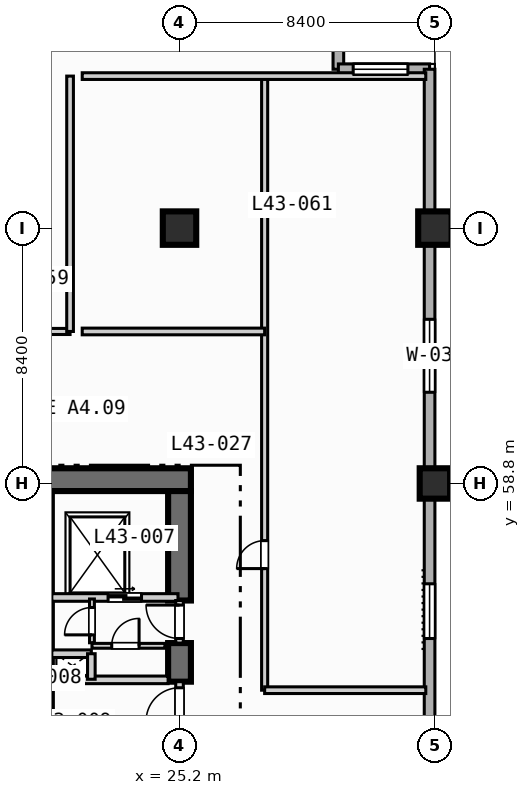
"""IFC4 building model, lengths in metres.
Left out: names, types, materials, properties, quantities, classifications, styles, units other than length and angle.
Written with IfcOpenShell. Run it as: python <this file> out.ifc"""

import sys

from ifc_helpers import new_model, si_unit, direction, frame, frame_2d, origin, origin_2d, place, context, subcontext, project, spatial, rectangle, extrude, element, fill, save


model = new_model("IFC4")
c1 = context("Model", 3, precision=1e-05, world=origin(), true_north=direction((0.0, 1.0)))
c2 = subcontext(c1, "Body", "Model", "MODEL_VIEW")
j1 = project(units=[si_unit("LENGTHUNIT", "METRE"), si_unit("PLANEANGLEUNIT", "RADIAN")], contexts=[c1])
p1 = place(None, origin())
s1 = spatial("IfcSite", under=j1, at=p1, CompositionType="ELEMENT")
p2 = place(p1, origin())
s2 = spatial("IfcBuilding", under=s1, at=p2, CompositionType="ELEMENT")
p3 = place(p2, frame((0.0, 0.0, 179.1)))
s3 = spatial("IfcBuildingStorey", under=s2, at=p3, CompositionType="ELEMENT", Elevation=179.1)
p4 = place(p3, frame((20.5, 58.925, 0.0), z_axis=(0.0, 0.0, 1.0), x_axis=(1.0, 0.0, 0.0)))
e1 = element("IfcWall", 1, at=p4, inside=s3, PredefinedType="SHEAR", context=c2, shape_type="SweptSolid", body=[
    extrude(rectangle(XDim=5.075, YDim=0.75, at=frame_2d((2.538, 0.0))), origin(), (0.0, 0.0, 1.0), 3.47),
])
p5 = place(p3, frame((25.2, 52.28, 0.0), z_axis=(0.0, 0.0, 1.0), x_axis=(0.0, 1.0, 0.0)))
e2 = element("IfcWall", 2, at=p5, inside=s3, PredefinedType="SHEAR", context=c2, shape_type="SweptSolid", body=[
    extrude(rectangle(XDim=1.27, YDim=0.75, at=frame_2d((0.635, 0.0))), origin(), (0.0, 0.0, 1.0), 3.47),
])
p6 = place(p3, frame((25.2, 54.95, 0.0), z_axis=(0.0, 0.0, 1.0), x_axis=(0.0, 1.0, 0.0)))
e3 = element("IfcWall", 3, at=p6, inside=s3, PredefinedType="SHEAR", context=c2, shape_type="SweptSolid", body=[
    extrude(rectangle(XDim=3.6, YDim=0.75, at=frame_2d((1.8, 0.0))), origin(), (0.0, 0.0, 1.0), 3.47),
])
p7 = place(p3, frame((25.2, 67.2, 0.0), z_axis=(0.0, 0.0, 1.0), x_axis=(1.0, 0.0, 0.0)))
e4 = element("IfcColumn", 4, at=p7, inside=s3, PredefinedType="COLUMN", context=c2, shape_type="SweptSolid", body=[
    extrude(rectangle(XDim=1.1, YDim=1.1, at=origin_2d()), origin(), (0.0, 0.0, 1.0), 3.7),
])
p8 = place(p3, frame((33.6, 58.8, 0.0), z_axis=(0.0, 0.0, 1.0), x_axis=(1.0, 0.0, 0.0)))
e5 = element("IfcColumn", 5, at=p8, inside=s3, PredefinedType="COLUMN", context=c2, shape_type="SweptSolid", body=[
    extrude(rectangle(XDim=1.0, YDim=1.0, at=origin_2d()), origin(), (0.0, 0.0, 1.0), 3.7),
])
p9 = place(p3, frame((33.6, 67.2, 0.0), z_axis=(0.0, 0.0, 1.0), x_axis=(1.0, 0.0, 0.0)))
e6 = element("IfcColumn", 6, at=p9, inside=s3, PredefinedType="COLUMN", context=c2, shape_type="SweptSolid", body=[
    extrude(rectangle(XDim=1.1, YDim=1.1, at=origin_2d()), origin(), (0.0, 0.0, 1.0), 3.7),
])
p10 = place(p3, frame((30.425, 75.425, 0.0), z_axis=(0.0, 0.0, 1.0), x_axis=(0.0, -1.0, 0.0)))
e7 = element("IfcWall", 7, at=p10, inside=s3, PredefinedType="STANDARD", context=c2, shape_type="SweptSolid", body=[
    extrude(rectangle(XDim=3.0, YDim=0.35, at=frame_2d((1.5, 0.0))), origin(), (0.0, 0.0, 1.0), 3.47),
])
p11 = place(p3, frame((30.425, 72.425, 0.0), z_axis=(0.0, 0.0, 1.0), x_axis=(1.0, 0.0, 0.0)))
e8 = element("IfcWall", 8, at=p11, inside=s3, PredefinedType="STANDARD", context=c2, shape_type="SweptSolid", body=[
    extrude(rectangle(XDim=3.0, YDim=0.35, at=frame_2d((1.5, 0.0))), origin(), (0.0, 0.0, 1.0), 3.47),
])
p12 = place(p11, frame((0.488, 0.0, 0.85)))
e9 = element("IfcOpeningElement", 9, at=p12, cuts=e8, PredefinedType="OPENING", context=c2, shape_type="SweptSolid", body=[
    extrude(rectangle(XDim=1.8, YDim=1.8, at=frame_2d((0.9, 0.9))), frame((0.0, 0.185, 0.0), z_axis=(0.0, -1.0, 0.0), x_axis=(1.0, 0.0, 0.0)), (0.0, 0.0, 1.0), 0.37),
])
p13 = place(p3, frame((33.425, 72.425, 0.0), z_axis=(0.0, 0.0, 1.0), x_axis=(0.0, -1.0, 0.0)))
e10 = element("IfcWall", 10, at=p13, inside=s3, PredefinedType="STANDARD", context=c2, shape_type="SweptSolid", body=[
    extrude(rectangle(XDim=39.0, YDim=0.35, at=frame_2d((19.5, 0.0))), origin(), (0.0, 0.0, 1.0), 3.47),
])
p14 = place(p13, frame((33.725, 0.0, 0.85)))
e11 = element("IfcOpeningElement", 11, at=p14, cuts=e10, PredefinedType="OPENING", context=c2, shape_type="SweptSolid", body=[
    extrude(rectangle(XDim=1.8, YDim=1.8, at=frame_2d((0.9, 0.9))), frame((0.0, 0.185, 0.0), z_axis=(0.0, -1.0, 0.0), x_axis=(1.0, 0.0, 0.0)), (0.0, 0.0, 1.0), 0.37),
])
p15 = place(p13, frame((16.925, 0.0, 0.85)))
e12 = element("IfcOpeningElement", 12, at=p15, cuts=e10, PredefinedType="OPENING", context=c2, shape_type="SweptSolid", body=[
    extrude(rectangle(XDim=1.8, YDim=1.8, at=frame_2d((0.9, 0.9))), frame((0.0, 0.185, 0.0), z_axis=(0.0, -1.0, 0.0), x_axis=(1.0, 0.0, 0.0)), (0.0, 0.0, 1.0), 0.37),
])
p16 = place(p13, frame((8.225, 0.0, 0.85)))
e13 = element("IfcOpeningElement", 13, at=p16, cuts=e10, PredefinedType="OPENING", context=c2, shape_type="SweptSolid", body=[
    extrude(rectangle(XDim=2.4, YDim=1.95, at=frame_2d((1.2, 0.975))), frame((0.0, 0.185, 0.0), z_axis=(0.0, -1.0, 0.0), x_axis=(1.0, 0.0, 0.0)), (0.0, 0.0, 1.0), 0.37),
])
p17 = place(p3, frame((25.2, 50.8, 0.0), z_axis=(0.0, 0.0, 1.0), x_axis=(0.0, 1.0, 0.0)))
e14 = element("IfcWall", 14, at=p17, inside=s3, PredefinedType="SOLIDWALL", context=c2, shape_type="SweptSolid", body=[
    extrude(rectangle(XDim=1.48, YDim=0.25, at=frame_2d((0.74, 0.0))), origin(), (0.0, 0.0, 1.0), 3.47),
])
p18 = place(p17, frame((0.18, 0.0, 0.0)))
e15 = element("IfcOpeningElement", 15, at=p18, cuts=e14, PredefinedType="OPENING", context=c2, shape_type="SweptSolid", body=[
    extrude(rectangle(XDim=1.1, YDim=2.15, at=frame_2d((0.55, 1.075))), frame((0.0, 0.135, 0.0), z_axis=(0.0, -1.0, 0.0), x_axis=(1.0, 0.0, 0.0)), (0.0, 0.0, 1.0), 0.27),
])
p19 = place(p3, frame((21.0, 52.34, 0.0), z_axis=(0.0, 0.0, 1.0), x_axis=(1.0, 0.0, 0.0)))
e16 = element("IfcWall", 16, at=p19, inside=s3, PredefinedType="SOLIDWALL", context=c2, shape_type="SweptSolid", body=[
    extrude(rectangle(XDim=3.825, YDim=0.25, at=frame_2d((1.913, 0.0))), origin(), (0.0, 0.0, 1.0), 3.47),
])
p20 = place(p3, frame((21.0, 55.05, 0.0), z_axis=(0.0, 0.0, 1.0), x_axis=(1.0, 0.0, 0.0)))
e17 = element("IfcWall", 17, at=p20, inside=s3, PredefinedType="SOLIDWALL", context=c2, shape_type="SweptSolid", body=[
    extrude(rectangle(XDim=4.15, YDim=0.25, at=frame_2d((2.075, 0.0))), origin(), (0.0, 0.0, 1.0), 3.47),
])
p21 = place(p20, frame((1.85, 0.0, 0.0)))
e18 = element("IfcOpeningElement", 18, at=p21, cuts=e17, PredefinedType="OPENING", context=c2, shape_type="SweptSolid", body=[
    extrude(rectangle(XDim=1.1, YDim=2.15, at=frame_2d((0.55, 1.075))), frame((0.0, 0.135, 0.0), z_axis=(0.0, -1.0, 0.0), x_axis=(1.0, 0.0, 0.0)), (0.0, 0.0, 1.0), 0.27),
])
p22 = place(p3, frame((25.2, 53.55, 0.0), z_axis=(0.0, 0.0, 1.0), x_axis=(0.0, 1.0, 0.0)))
e19 = element("IfcWall", 19, at=p22, inside=s3, PredefinedType="SOLIDWALL", context=c2, shape_type="SweptSolid", body=[
    extrude(rectangle(XDim=1.4, YDim=0.25, at=frame_2d((0.7, 0.0))), origin(), (0.0, 0.0, 1.0), 3.47),
])
p23 = place(p22, frame((0.15, 0.0, 0.0)))
e20 = element("IfcOpeningElement", 20, at=p23, cuts=e19, PredefinedType="OPENING", context=c2, shape_type="SweptSolid", body=[
    extrude(rectangle(XDim=1.1, YDim=2.15, at=frame_2d((0.55, 1.075))), frame((0.0, 0.135, 0.0), z_axis=(0.0, -1.0, 0.0), x_axis=(1.0, 0.0, 0.0)), (0.0, 0.0, 1.0), 0.27),
])
p24 = place(p3, frame((21.0, 53.2, 0.0), z_axis=(0.0, 0.0, 1.0), x_axis=(1.0, 0.0, 0.0)))
e21 = element("IfcWall", 21, at=p24, inside=s3, PredefinedType="SOLIDWALL", context=c2, shape_type="SweptSolid", body=[
    extrude(rectangle(XDim=1.3, YDim=0.25, at=frame_2d((0.65, 0.0))), origin(), (0.0, 0.0, 1.0), 3.47),
])
p25 = place(p3, frame((22.3, 52.36, 0.0), z_axis=(0.0, 0.0, 1.0), x_axis=(0.0, 1.0, 0.0)))
e22 = element("IfcWall", 22, at=p25, inside=s3, PredefinedType="SOLIDWALL", context=c2, shape_type="SweptSolid", body=[
    extrude(rectangle(XDim=0.84, YDim=0.25, at=frame_2d((0.42, 0.0))), origin(), (0.0, 0.0, 1.0), 3.47),
])
p26 = place(p3, frame((22.32, 53.56, 0.0), z_axis=(0.0, 0.0, 1.0), x_axis=(0.0, 1.0, 0.0)))
e23 = element("IfcWall", 23, at=p26, inside=s3, PredefinedType="PARTITIONING", context=c2, shape_type="SweptSolid", body=[
    extrude(rectangle(XDim=1.44, YDim=0.16, at=frame_2d((0.72, 0.0))), origin(), (0.0, 0.0, 1.0), 3.47),
])
p27 = place(p26, frame((0.26, 0.0, 0.0)))
e24 = element("IfcOpeningElement", 24, at=p27, cuts=e23, PredefinedType="OPENING", context=c2, shape_type="SweptSolid", body=[
    extrude(rectangle(XDim=0.9, YDim=2.1, at=frame_2d((0.45, 1.05))), frame((0.0, 0.09, 0.0), z_axis=(0.0, -1.0, 0.0), x_axis=(1.0, 0.0, 0.0)), (0.0, 0.0, 1.0), 0.18),
])
p28 = place(p3, frame((22.32, 53.46, 0.0), z_axis=(0.0, 0.0, 1.0), x_axis=(1.0, 0.0, 0.0)))
e25 = element("IfcWall", 25, at=p28, inside=s3, PredefinedType="PARTITIONING", context=c2, shape_type="SweptSolid", body=[
    extrude(rectangle(XDim=2.4, YDim=0.16, at=frame_2d((1.2, 0.0))), origin(), (0.0, 0.0, 1.0), 3.47),
])
p29 = place(p28, frame((0.65, 0.0, 0.0)))
e26 = element("IfcOpeningElement", 26, at=p29, cuts=e25, PredefinedType="OPENING", context=c2, shape_type="SweptSolid", body=[
    extrude(rectangle(XDim=0.9, YDim=2.1, at=frame_2d((0.45, 1.05))), frame((0.0, 0.09, 0.0), z_axis=(0.0, -1.0, 0.0), x_axis=(1.0, 0.0, 0.0)), (0.0, 0.0, 1.0), 0.18),
])
p30 = place(p3, frame((3.4, 63.8, 0.0), z_axis=(0.0, 0.0, 1.0), x_axis=(1.0, 0.0, 0.0)))
e27 = element("IfcWall", 27, at=p30, inside=s3, PredefinedType="PARTITIONING", context=c2, shape_type="SweptSolid", body=[
    extrude(rectangle(XDim=18.2, YDim=0.2, at=frame_2d((9.1, 0.0))), origin(), (0.0, 0.0, 1.0), 3.47),
])
p31 = place(p30, frame((4.05, 0.0, 0.0)))
e28 = element("IfcOpeningElement", 28, at=p31, cuts=e27, PredefinedType="OPENING", context=c2, shape_type="SweptSolid", body=[
    extrude(rectangle(XDim=1.0, YDim=2.15, at=frame_2d((0.5, 1.075))), frame((0.0, 0.11, 0.0), z_axis=(0.0, -1.0, 0.0), x_axis=(1.0, 0.0, 0.0)), (0.0, 0.0, 1.0), 0.22),
])
p32 = place(p3, frame((21.6, 63.8, 0.0), z_axis=(0.0, 0.0, 1.0), x_axis=(0.0, 1.0, 0.0)))
e29 = element("IfcWall", 29, at=p32, inside=s3, PredefinedType="PARTITIONING", context=c2, shape_type="SweptSolid", body=[
    extrude(rectangle(XDim=8.4, YDim=0.22, at=frame_2d((4.2, 0.0))), origin(), (0.0, 0.0, 1.0), 3.47),
])
p33 = place(p3, frame((28.0, 52.0, 0.0), z_axis=(0.0, 0.0, 1.0), x_axis=(0.0, 1.0, 0.0)))
e30 = element("IfcWall", 30, at=p33, inside=s3, PredefinedType="PARTITIONING", context=c2, shape_type="SweptSolid", body=[
    extrude(rectangle(XDim=20.2, YDim=0.2, at=frame_2d((10.1, 0.0))), origin(), (0.0, 0.0, 1.0), 3.47),
])
p34 = place(p33, frame((4.0, 0.0, 0.0)))
e31 = element("IfcOpeningElement", 31, at=p34, cuts=e30, PredefinedType="OPENING", context=c2, shape_type="SweptSolid", body=[
    extrude(rectangle(XDim=0.92, YDim=2.1, at=frame_2d((0.46, 1.05))), frame((0.0, 0.11, 0.0), z_axis=(0.0, -1.0, 0.0), x_axis=(1.0, 0.0, 0.0)), (0.0, 0.0, 1.0), 0.22),
])
p35 = place(p3, frame((28.0, 52.0, 0.0), z_axis=(0.0, 0.0, 1.0), x_axis=(1.0, 0.0, 0.0)))
e32 = element("IfcWall", 32, at=p35, inside=s3, PredefinedType="PARTITIONING", context=c2, shape_type="SweptSolid", body=[
    extrude(rectangle(XDim=5.3, YDim=0.22, at=frame_2d((2.65, 0.0))), origin(), (0.0, 0.0, 1.0), 3.47),
])
p36 = place(p3, frame((22.0, 72.2, 0.0), z_axis=(0.0, 0.0, 1.0), x_axis=(1.0, 0.0, 0.0)))
e33 = element("IfcWall", 33, at=p36, inside=s3, PredefinedType="PARTITIONING", context=c2, shape_type="SweptSolid", body=[
    extrude(rectangle(XDim=11.3, YDim=0.22, at=frame_2d((5.65, 0.0))), origin(), (0.0, 0.0, 1.0), 3.47),
])
p37 = place(p3, frame((22.0, 63.8, 0.0), z_axis=(0.0, 0.0, 1.0), x_axis=(1.0, 0.0, 0.0)))
e34 = element("IfcWall", 34, at=p37, inside=s3, PredefinedType="PARTITIONING", context=c2, shape_type="SweptSolid", body=[
    extrude(rectangle(XDim=6.0, YDim=0.22, at=frame_2d((3.0, 0.0))), origin(), (0.0, 0.0, 1.0), 3.47),
])
p38 = place(p12, origin())
e35 = element("IfcWindow", 35, at=p38, inside=s3, PartitioningType="SINGLE_PANEL", PredefinedType="WINDOW", context=c2, shape_type="SweptSolid", body=[
    extrude(rectangle(XDim=1.8, YDim=1.8, at=frame_2d((0.9, 0.9))), frame((0.0, 0.03, 0.0), z_axis=(0.0, -1.0, 0.0), x_axis=(1.0, 0.0, 0.0)), (0.0, 0.0, 1.0), 0.06),
])
fill(e9, e35)
p39 = place(p15, origin())
e36 = element("IfcWindow", 36, at=p39, inside=s3, PartitioningType="SINGLE_PANEL", PredefinedType="WINDOW", context=c2, shape_type="SweptSolid", body=[
    extrude(rectangle(XDim=1.8, YDim=1.8, at=frame_2d((0.9, 0.9))), frame((0.0, 0.03, 0.0), z_axis=(0.0, -1.0, 0.0), x_axis=(1.0, 0.0, 0.0)), (0.0, 0.0, 1.0), 0.06),
])
fill(e12, e36)
p40 = place(p16, origin())
e37 = element("IfcWindow", 37, at=p40, inside=s3, PartitioningType="SINGLE_PANEL", PredefinedType="WINDOW", context=c2, shape_type="SweptSolid", body=[
    extrude(rectangle(XDim=2.4, YDim=1.95, at=frame_2d((1.2, 0.975))), frame((0.0, 0.03, 0.0), z_axis=(0.0, -1.0, 0.0), x_axis=(1.0, 0.0, 0.0)), (0.0, 0.0, 1.0), 0.06),
])
fill(e13, e37)
p41 = place(p18, origin())
e38 = element("IfcDoor", 38, at=p41, inside=s3, OperationType="SINGLE_SWING_LEFT", PredefinedType="DOOR", context=c2, shape_type="SweptSolid", body=[
    extrude(rectangle(XDim=1.1, YDim=2.15, at=frame_2d((0.55, 1.075))), frame((0.0, 0.025, 0.0), z_axis=(0.0, -1.0, 0.0), x_axis=(1.0, 0.0, 0.0)), (0.0, 0.0, 1.0), 0.05),
])
fill(e15, e38)
p42 = place(p21, origin())
e39 = element("IfcDoor", 39, at=p42, inside=s3, OperationType="SLIDING_TO_LEFT", PredefinedType="DOOR", context=c2, shape_type="SweptSolid", body=[
    extrude(rectangle(XDim=1.1, YDim=2.15, at=frame_2d((0.55, 1.075))), frame((0.0, 0.025, 0.0), z_axis=(0.0, -1.0, 0.0), x_axis=(1.0, 0.0, 0.0)), (0.0, 0.0, 1.0), 0.05),
])
fill(e18, e39)
p43 = place(p23, origin())
e40 = element("IfcDoor", 40, at=p43, inside=s3, OperationType="SINGLE_SWING_RIGHT", PredefinedType="DOOR", context=c2, shape_type="SweptSolid", body=[
    extrude(rectangle(XDim=1.1, YDim=2.15, at=frame_2d((0.55, 1.075))), frame((0.0, 0.025, 0.0), z_axis=(0.0, -1.0, 0.0), x_axis=(1.0, 0.0, 0.0)), (0.0, 0.0, 1.0), 0.05),
])
fill(e20, e40)
p44 = place(p27, origin())
e41 = element("IfcDoor", 41, at=p44, inside=s3, OperationType="SINGLE_SWING_LEFT", PredefinedType="DOOR", context=c2, shape_type="SweptSolid", body=[
    extrude(rectangle(XDim=0.9, YDim=2.1, at=frame_2d((0.45, 1.05))), frame((0.0, 0.025, 0.0), z_axis=(0.0, -1.0, 0.0), x_axis=(1.0, 0.0, 0.0)), (0.0, 0.0, 1.0), 0.05),
])
fill(e24, e41)
p45 = place(p29, origin())
e42 = element("IfcDoor", 42, at=p45, inside=s3, OperationType="SINGLE_SWING_RIGHT", PredefinedType="DOOR", context=c2, shape_type="SweptSolid", body=[
    extrude(rectangle(XDim=0.9, YDim=2.1, at=frame_2d((0.45, 1.05))), frame((0.0, 0.025, 0.0), z_axis=(0.0, -1.0, 0.0), x_axis=(1.0, 0.0, 0.0)), (0.0, 0.0, 1.0), 0.05),
])
fill(e26, e42)
p46 = place(p34, origin())
e43 = element("IfcDoor", 43, at=p46, inside=s3, OperationType="SINGLE_SWING_LEFT", PredefinedType="DOOR", context=c2, shape_type="SweptSolid", body=[
    extrude(rectangle(XDim=0.92, YDim=2.1, at=frame_2d((0.46, 1.05))), frame((0.0, 0.025, 0.0), z_axis=(0.0, -1.0, 0.0), x_axis=(1.0, 0.0, 0.0)), (0.0, 0.0, 1.0), 0.05),
])
fill(e31, e43)
save(model, sys.argv[1])
